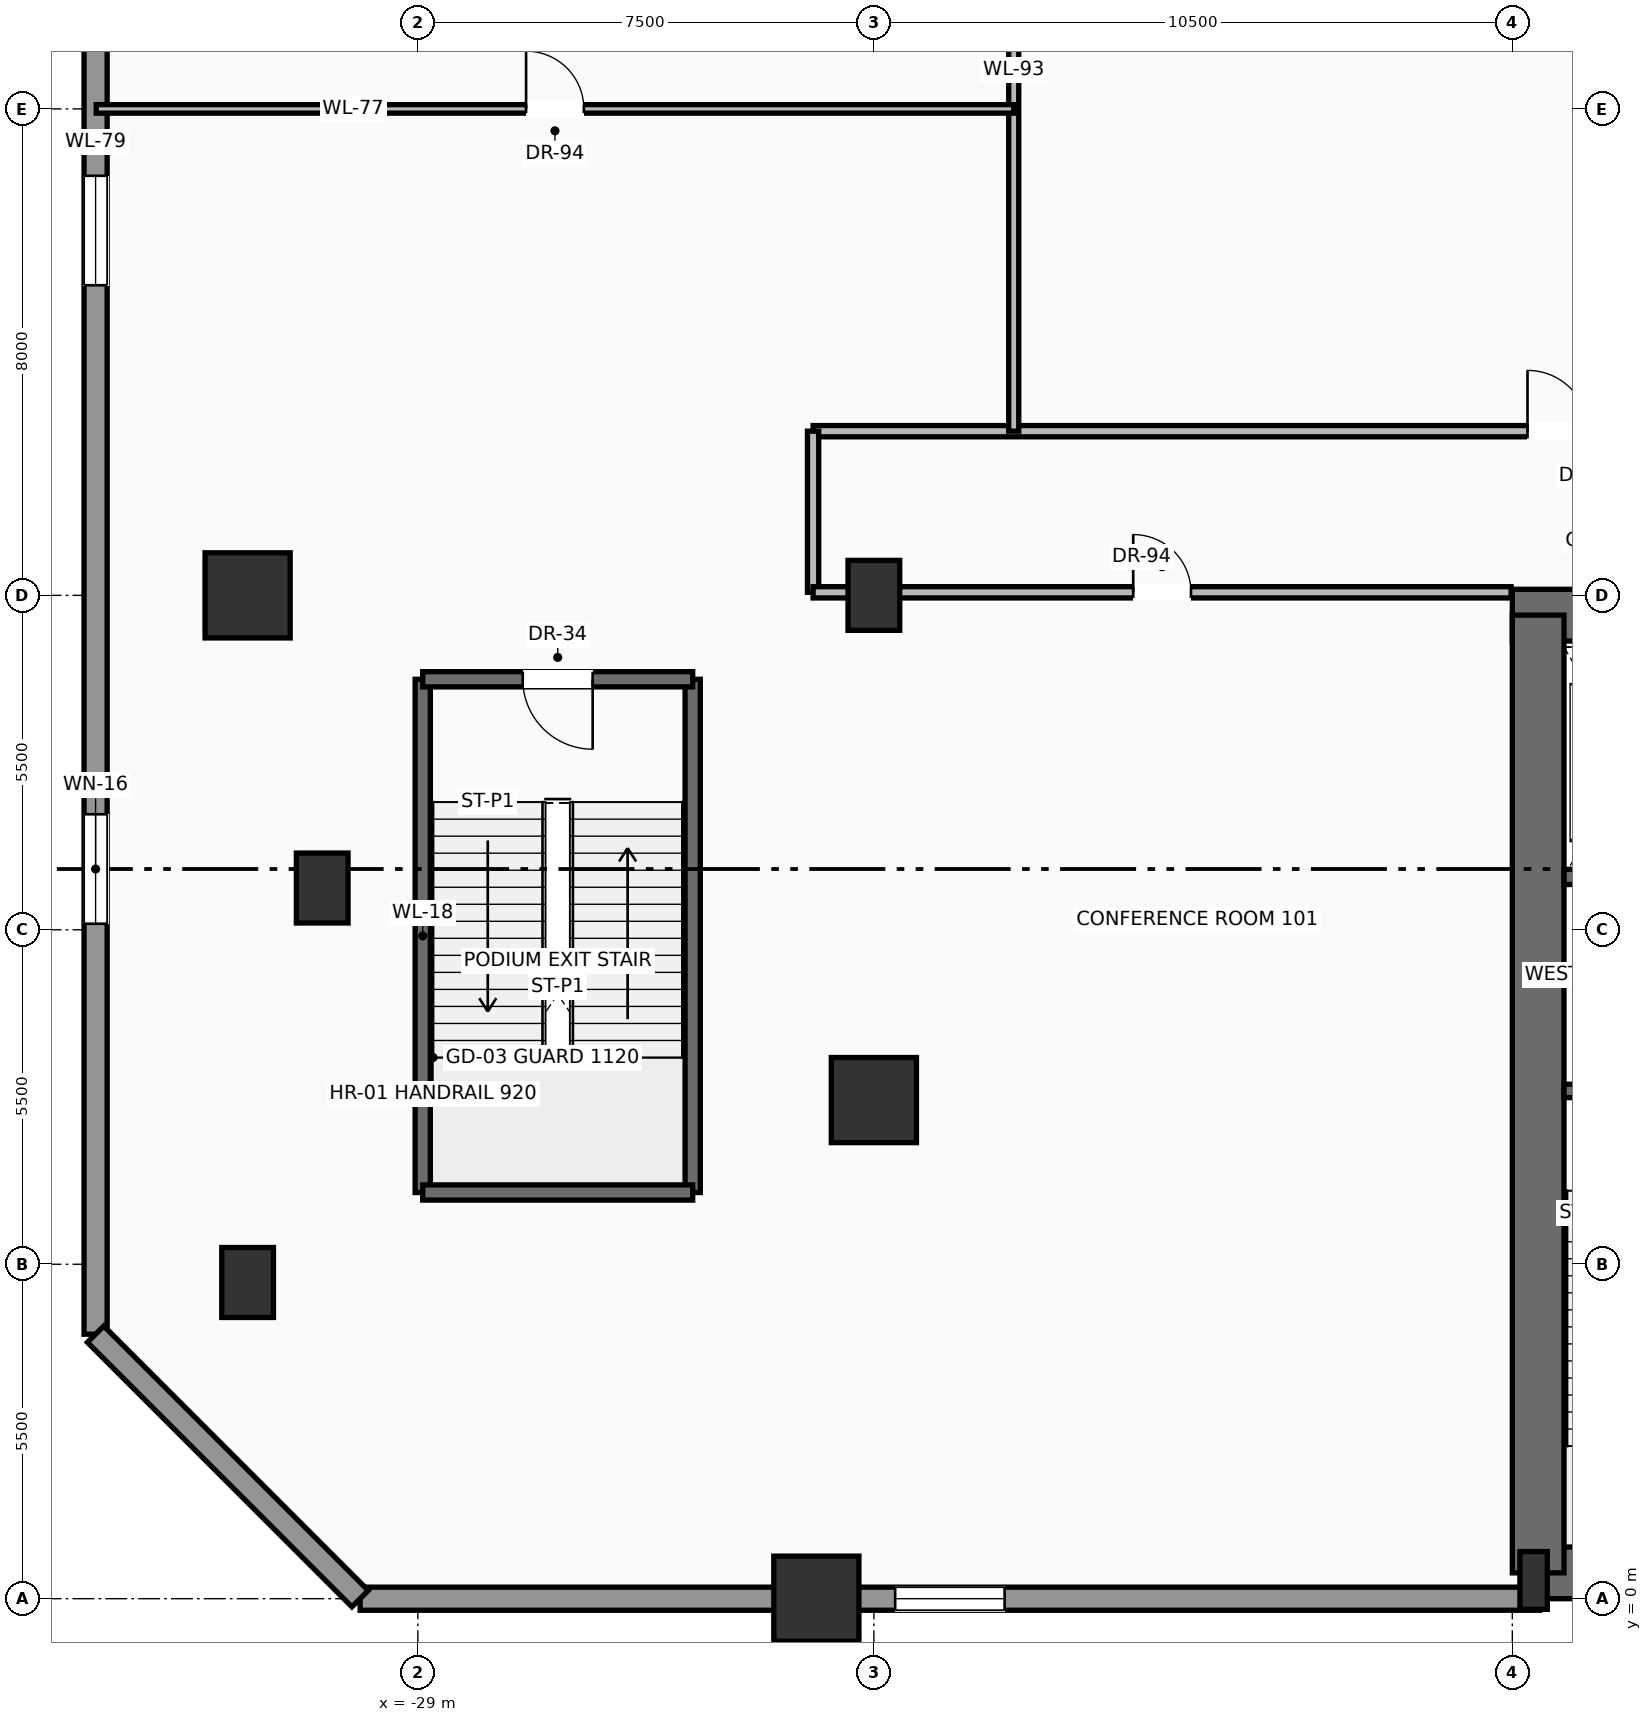
"""IFC4 building model, lengths in metres.
Left out: names, types, materials, properties, quantities, classifications, styles, units other than length and angle.
Written with IfcOpenShell. Run it as: python <this file> out.ifc"""

import sys

from ifc_helpers import new_model, si_unit, direction, frame, frame_2d, origin, origin_2d, place, context, subcontext, project, spatial, rectangle, hollow_rectangle, extrude, source, transform, mapped, element, fill, save


model = new_model("IFC4")
c1 = context("Model", 3, precision=1e-05, world=origin(), true_north=direction((0.0, 1.0)))
c2 = subcontext(c1, "Body", "Model", "MODEL_VIEW")
j1 = project(units=[si_unit("LENGTHUNIT", "METRE"), si_unit("PLANEANGLEUNIT", "RADIAN")], contexts=[c1])
p1 = place(None, origin())
s1 = spatial("IfcSite", under=j1, at=p1, CompositionType="ELEMENT")
p2 = place(p1, origin())
s2 = spatial("IfcBuilding", under=s1, at=p2, CompositionType="ELEMENT")
p3 = place(p2, frame((0.0, 0.0, 5.5)))
s3 = spatial("IfcBuildingStorey", under=s2, at=p3, CompositionType="ELEMENT", Elevation=5.5)
p4 = place(p3, frame((-10.65, 0.425, 0.0), z_axis=(0.0, 0.0, 1.0), x_axis=(1.0, 0.0, 0.0)))
e1 = element("IfcWall", 1, at=p4, inside=s3, PredefinedType="SHEAR", context=c2, shape_type="SweptSolid", body=[
    extrude(rectangle(XDim=21.3, YDim=0.85, at=frame_2d((10.65, 0.0))), origin(), (0.0, 0.0, 1.0), 5.17),
])
p5 = place(p3, frame((-11.0, 16.175, 0.0), z_axis=(0.0, 0.0, 1.0), x_axis=(1.0, 0.0, 0.0)))
e2 = element("IfcWall", 2, at=p5, inside=s3, PredefinedType="SHEAR", context=c2, shape_type="SweptSolid", body=[
    extrude(rectangle(XDim=22.0, YDim=0.85, at=frame_2d((11.0, 0.0))), origin(), (0.0, 0.0, 1.0), 5.17),
])
p6 = place(p5, frame((3.57, 0.0, 0.0)))
e3 = element("IfcOpeningElement", 3, at=p6, cuts=e2, PredefinedType="OPENING", context=c2, shape_type="SweptSolid", body=[
    extrude(rectangle(XDim=1.3, YDim=2.3, at=frame_2d((0.65, 1.15))), frame((0.0, 0.435, 0.0), z_axis=(0.0, -1.0, 0.0), x_axis=(1.0, 0.0, 0.0)), (0.0, 0.0, 1.0), 0.87),
])
p7 = place(p5, frame((10.0, 0.0, 0.0)))
e4 = element("IfcOpeningElement", 4, at=p7, cuts=e2, PredefinedType="OPENING", context=c2, shape_type="SweptSolid", body=[
    extrude(rectangle(XDim=2.0, YDim=2.4, at=frame_2d((1.0, 1.2))), frame((0.0, 0.435, 0.0), z_axis=(0.0, -1.0, 0.0), x_axis=(1.0, 0.0, 0.0)), (0.0, 0.0, 1.0), 0.87),
])
p8 = place(p3, frame((-10.575, 0.425, 0.0), z_axis=(0.0, 0.0, 1.0), x_axis=(0.0, 1.0, 0.0)))
e5 = element("IfcWall", 5, at=p8, inside=s3, PredefinedType="SHEAR", context=c2, shape_type="SweptSolid", body=[
    extrude(rectangle(XDim=15.75, YDim=0.85, at=frame_2d((7.875, 0.0))), origin(), (0.0, 0.0, 1.0), 5.17),
])
m1 = source(origin(), c2, "Body", "SweptSolid", [
    extrude(rectangle(XDim=0.45, YDim=0.95, at=origin_2d()), origin(), (0.0, 0.0, 1.0), 5.5),
])
p9 = place(p3, frame((-10.65, 0.3, 0.0), z_axis=(0.0, 0.0, 1.0), x_axis=(1.0, 0.0, 0.0)))
e6 = element("IfcColumn", 6, at=p9, inside=s3, PredefinedType="PILASTER", context=c2, shape_type="MappedRepresentation", body=[
    mapped(m1, transform((0.0, 0.0, 0.0), scale=1.0)),
])
m2 = source(origin(), c2, "Body", "SweptSolid", [
    extrude(hollow_rectangle(XDim=1.4, YDim=1.4, WallThickness=0.07, at=origin_2d()), origin(), (0.0, 0.0, 1.0), 5.5),
])
for number, where, z_axis, x_axis in (
    (7, (-22.446, 0.0, 0.0), (0.0, 0.0, 1.0), (1.0, 0.0, 0.0)),
    (8, (-21.5, 8.2, 0.0), (0.0, 0.0, 1.0), (1.0, 0.0, 0.0)),
    (9, (-31.8, 16.5, 0.0), (0.0, 0.0, 1.0), (1.0, 0.0, 0.0)),
):
    element("IfcColumn", number, at=place(p3, frame(where, z_axis=z_axis, x_axis=x_axis)), inside=s3, PredefinedType="COLUMN", context=c2, shape_type="MappedRepresentation", body=[
        mapped(m2, transform((0.0, 0.0, 0.0), scale=1.0)),
    ])
m3 = source(origin(), c2, "Body", "SweptSolid", [
    extrude(rectangle(XDim=0.85, YDim=1.15, at=origin_2d()), origin(), (0.0, 0.0, 1.0), 5.5),
])
for number, where, z_axis, x_axis in (
    (10, (-21.5, 16.5, 0.0), (0.0, 0.0, 1.0), (1.0, 0.0, 0.0)),
    (11, (-31.8, 5.2, 0.0), (0.0, 0.0, 1.0), (1.0, 0.0, 0.0)),
    (12, (-30.573, 11.687, 0.0), (0.0, 0.0, 1.0), (1.0, 0.0, 0.0)),
):
    element("IfcColumn", number, at=place(p3, frame(where, z_axis=z_axis, x_axis=x_axis)), inside=s3, PredefinedType="COLUMN", context=c2, shape_type="MappedRepresentation", body=[
        mapped(m3, transform((0.0, 0.0, 0.0), scale=1.0)),
    ])
p10 = place(p3, frame((-34.3, 4.35, 0.0), z_axis=(0.0, 0.0, 1.0), x_axis=(0.0, 1.0, 0.0)))
e13 = element("IfcWall", 13, at=p10, inside=s3, PredefinedType="SOLIDWALL", context=c2, shape_type="SweptSolid", body=[
    extrude(rectangle(XDim=39.2, YDim=0.38, at=frame_2d((19.6, 0.0))), origin(), (0.0, 0.0, 1.0), 4.11),
])
p11 = place(p10, frame((6.75, 0.0, 0.95)))
e14 = element("IfcOpeningElement", 14, at=p11, cuts=e13, PredefinedType="OPENING", context=c2, shape_type="SweptSolid", body=[
    extrude(rectangle(XDim=1.8, YDim=2.4, at=frame_2d((0.9, 1.2))), frame((0.0, 0.2, 0.0), z_axis=(0.0, -1.0, 0.0), x_axis=(1.0, 0.0, 0.0)), (0.0, 0.0, 1.0), 0.4),
])
p12 = place(p10, frame((17.25, 0.0, 0.95)))
e15 = element("IfcOpeningElement", 15, at=p12, cuts=e13, PredefinedType="OPENING", context=c2, shape_type="SweptSolid", body=[
    extrude(rectangle(XDim=1.8, YDim=2.4, at=frame_2d((0.9, 1.2))), frame((0.0, 0.2, 0.0), z_axis=(0.0, -1.0, 0.0), x_axis=(1.0, 0.0, 0.0)), (0.0, 0.0, 1.0), 0.4),
])
p13 = place(p10, frame((27.75, 0.0, 0.95)))
e16 = element("IfcOpeningElement", 16, at=p13, cuts=e13, PredefinedType="OPENING", context=c2, shape_type="SweptSolid", body=[
    extrude(rectangle(XDim=1.8, YDim=2.4, at=frame_2d((0.9, 1.2))), frame((0.0, 0.2, 0.0), z_axis=(0.0, -1.0, 0.0), x_axis=(1.0, 0.0, 0.0)), (0.0, 0.0, 1.0), 0.4),
])
p14 = place(p3, frame((-10.55, 0.0, 0.0), z_axis=(0.0, 0.0, 1.0), x_axis=(-1.0, 0.0, 0.0)))
e17 = element("IfcWall", 17, at=p14, inside=s3, PredefinedType="SOLIDWALL", context=c2, shape_type="SweptSolid", body=[
    extrude(rectangle(XDim=19.4, YDim=0.38, at=frame_2d((9.7, 0.0))), origin(), (0.0, 0.0, 1.0), 4.11),
])
p15 = place(p14, frame((8.8, 0.0, 0.95)))
e18 = element("IfcOpeningElement", 18, at=p15, cuts=e17, PredefinedType="OPENING", context=c2, shape_type="SweptSolid", body=[
    extrude(rectangle(XDim=1.8, YDim=2.4, at=frame_2d((0.9, 1.2))), frame((0.0, 0.2, 0.0), z_axis=(0.0, -1.0, 0.0), x_axis=(1.0, 0.0, 0.0)), (0.0, 0.0, 1.0), 0.4),
])
p16 = place(p3, frame((-29.95, 0.0, 0.0), z_axis=(0.0, 0.0, 1.0), x_axis=(-0.707106781187, 0.707106781187, 0.0)))
e19 = element("IfcWall", 19, at=p16, inside=s3, PredefinedType="SOLIDWALL", context=c2, shape_type="SweptSolid", body=[
    extrude(rectangle(XDim=6.152, YDim=0.38, at=frame_2d((3.076, 0.0))), origin(), (0.0, 0.0, 1.0), 4.11),
])
p17 = place(p3, frame((-5.5, 8.35, 0.0), z_axis=(0.0, 0.0, 1.0), x_axis=(-1.0, 0.0, 0.0)))
e20 = element("IfcWall", 20, at=p17, inside=s3, PredefinedType="SOLIDWALL", context=c2, shape_type="SweptSolid", body=[
    extrude(rectangle(XDim=4.65, YDim=0.22, at=frame_2d((2.325, 0.0))), origin(), (0.0, 0.0, 1.0), 5.17),
])
p18 = place(p17, frame((2.5, 0.0, 0.0)))
e21 = element("IfcOpeningElement", 21, at=p18, cuts=e20, PredefinedType="OPENING", context=c2, shape_type="SweptSolid", body=[
    extrude(rectangle(XDim=1.15, YDim=2.2, at=frame_2d((0.575, 1.1))), frame((0.0, 0.12, 0.0), z_axis=(0.0, -1.0, 0.0), x_axis=(1.0, 0.0, 0.0)), (0.0, 0.0, 1.0), 0.24),
])
p19 = place(p3, frame((-5.5, 11.87, 0.0), z_axis=(0.0, 0.0, 1.0), x_axis=(-1.0, 0.0, 0.0)))
e22 = element("IfcWall", 22, at=p19, inside=s3, PredefinedType="SOLIDWALL", context=c2, shape_type="SweptSolid", body=[
    extrude(rectangle(XDim=4.65, YDim=0.25, at=frame_2d((2.325, 0.0))), origin(), (0.0, 0.0, 1.0), 5.17),
])
p20 = place(p19, frame((2.95, 0.0, 0.0)))
e23 = element("IfcOpeningElement", 23, at=p20, cuts=e22, PredefinedType="OPENING", context=c2, shape_type="SweptSolid", body=[
    extrude(rectangle(XDim=1.2, YDim=2.25, at=frame_2d((0.6, 1.125))), frame((0.0, 0.135, 0.0), z_axis=(0.0, -1.0, 0.0), x_axis=(1.0, 0.0, 0.0)), (0.0, 0.0, 1.0), 0.27),
])
for number, where, z_axis, x_axis in (
    (24, (-28.92, 6.68, 0.0), (0.0, 0.0, 1.0), (0.0, 1.0, 0.0)),
    (25, (-24.48, 6.68, 0.0), (0.0, 0.0, 1.0), (0.0, 1.0, 0.0)),
):
    element("IfcWall", number, at=place(p3, frame(where, z_axis=z_axis, x_axis=x_axis)), inside=s3, PredefinedType="SOLIDWALL", context=c2, shape_type="SweptSolid", body=[
        extrude(rectangle(XDim=8.44, YDim=0.25, at=frame_2d((4.22, 0.0))), origin(), (0.0, 0.0, 1.0), 5.17),
    ])
p21 = place(p3, frame((-28.92, 6.68, 0.0), z_axis=(0.0, 0.0, 1.0), x_axis=(1.0, 0.0, 0.0)))
e26 = element("IfcWall", 26, at=p21, inside=s3, PredefinedType="SOLIDWALL", context=c2, shape_type="SweptSolid", body=[
    extrude(rectangle(XDim=4.44, YDim=0.25, at=frame_2d((2.22, 0.0))), origin(), (0.0, 0.0, 1.0), 5.17),
])
p22 = place(p3, frame((-24.48, 15.12, 0.0), z_axis=(0.0, 0.0, 1.0), x_axis=(-1.0, 0.0, 0.0)))
e27 = element("IfcWall", 27, at=p22, inside=s3, PredefinedType="SOLIDWALL", context=c2, shape_type="SweptSolid", body=[
    extrude(rectangle(XDim=4.44, YDim=0.25, at=frame_2d((2.22, 0.0))), origin(), (0.0, 0.0, 1.0), 5.17),
])
p23 = place(p22, frame((1.645, 0.0, 0.0)))
e28 = element("IfcOpeningElement", 28, at=p23, cuts=e27, PredefinedType="OPENING", context=c2, shape_type="SweptSolid", body=[
    extrude(rectangle(XDim=1.15, YDim=2.2, at=frame_2d((0.575, 1.1))), frame((0.0, 0.135, 0.0), z_axis=(0.0, -1.0, 0.0), x_axis=(1.0, 0.0, 0.0)), (0.0, 0.0, 1.0), 0.27),
])
p24 = place(p3, frame((-22.5, 19.2, 0.0), z_axis=(0.0, 0.0, 1.0), x_axis=(1.0, 0.0, 0.0)))
e29 = element("IfcWall", 29, at=p24, inside=s3, PredefinedType="PARTITIONING", context=c2, shape_type="SweptSolid", body=[
    extrude(rectangle(XDim=45.0, YDim=0.185, at=frame_2d((22.5, 0.0))), origin(), (0.0, 0.0, 1.0), 4.122),
])
p25 = place(p24, frame((11.75, 0.0, 0.0)))
e30 = element("IfcOpeningElement", 30, at=p25, cuts=e29, PredefinedType="OPENING", context=c2, shape_type="SweptSolid", body=[
    extrude(rectangle(XDim=2.0, YDim=2.4, at=frame_2d((1.0, 1.2))), frame((0.0, 0.103, 0.0), z_axis=(0.0, -1.0, 0.0), x_axis=(1.0, 0.0, 0.0)), (0.0, 0.0, 1.0), 0.205),
])
p26 = place(p24, frame((31.25, 0.0, 0.0)))
e31 = element("IfcOpeningElement", 31, at=p26, cuts=e29, PredefinedType="OPENING", context=c2, shape_type="SweptSolid", body=[
    extrude(rectangle(XDim=2.0, YDim=2.4, at=frame_2d((1.0, 1.2))), frame((0.0, 0.103, 0.0), z_axis=(0.0, -1.0, 0.0), x_axis=(1.0, 0.0, 0.0)), (0.0, 0.0, 1.0), 0.205),
])
p27 = place(p3, frame((-22.5, 16.55, 0.0), z_axis=(0.0, 0.0, 1.0), x_axis=(0.0, 1.0, 0.0)))
e32 = element("IfcWall", 32, at=p27, inside=s3, PredefinedType="PARTITIONING", context=c2, shape_type="SweptSolid", body=[
    extrude(rectangle(XDim=2.65, YDim=0.185, at=frame_2d((1.325, 0.0))), origin(), (0.0, 0.0, 1.0), 5.162),
])
p28 = place(p3, frame((-22.5, 16.55, 0.0), z_axis=(0.0, 0.0, 1.0), x_axis=(1.0, 0.0, 0.0)))
e33 = element("IfcWall", 33, at=p28, inside=s3, PredefinedType="PARTITIONING", context=c2, shape_type="SweptSolid", body=[
    extrude(rectangle(XDim=11.48, YDim=0.185, at=frame_2d((5.74, 0.0))), origin(), (0.0, 0.0, 1.0), 4.122),
])
p29 = place(p28, frame((5.265, 0.0, 0.0)))
e34 = element("IfcOpeningElement", 34, at=p29, cuts=e33, PredefinedType="OPENING", context=c2, shape_type="SweptSolid", body=[
    extrude(rectangle(XDim=0.95, YDim=2.2, at=frame_2d((0.475, 1.1))), frame((0.0, 0.103, 0.0), z_axis=(0.0, -1.0, 0.0), x_axis=(1.0, 0.0, 0.0)), (0.0, 0.0, 1.0), 0.205),
])
p30 = place(p3, frame((-19.2, 19.2, 0.0), z_axis=(0.0, 0.0, 1.0), x_axis=(0.0, 1.0, 0.0)))
e35 = element("IfcWall", 35, at=p30, inside=s3, PredefinedType="PARTITIONING", context=c2, shape_type="SweptSolid", body=[
    extrude(rectangle(XDim=21.2, YDim=0.165, at=frame_2d((10.6, 0.0))), origin(), (0.0, 0.0, 1.0), 4.122),
])
p31 = place(p30, frame((8.824, 0.0, 0.0)))
e36 = element("IfcOpeningElement", 36, at=p31, cuts=e35, PredefinedType="OPENING", context=c2, shape_type="SweptSolid", body=[
    extrude(rectangle(XDim=1.5, YDim=2.25, at=frame_2d((0.75, 1.125))), frame((0.0, 0.093, 0.0), z_axis=(0.0, -1.0, 0.0), x_axis=(1.0, 0.0, 0.0)), (0.0, 0.0, 1.0), 0.185),
])
p32 = place(p3, frame((-34.29, 24.5, 0.0), z_axis=(0.0, 0.0, 1.0), x_axis=(1.0, 0.0, 0.0)))
e37 = element("IfcWall", 37, at=p32, inside=s3, PredefinedType="PARTITIONING", context=c2, shape_type="SweptSolid", body=[
    extrude(rectangle(XDim=15.09, YDim=0.14, at=frame_2d((7.545, 0.0))), origin(), (0.0, 0.0, 1.0), 4.235),
])
p33 = place(p32, frame((7.07, 0.0, 0.0)))
e38 = element("IfcOpeningElement", 38, at=p33, cuts=e37, PredefinedType="OPENING", context=c2, shape_type="SweptSolid", body=[
    extrude(rectangle(XDim=0.95, YDim=2.2, at=frame_2d((0.475, 1.1))), frame((0.0, 0.08, 0.0), z_axis=(0.0, -1.0, 0.0), x_axis=(1.0, 0.0, 0.0)), (0.0, 0.0, 1.0), 0.16),
])
m4 = source(origin(), c2, "Body", "SweptSolid", [
    extrude(rectangle(XDim=1.8, YDim=2.4, at=frame_2d((0.9, 1.2))), frame((0.0, 0.03, 0.0), z_axis=(0.0, -1.0, 0.0), x_axis=(1.0, 0.0, 0.0)), (0.0, 0.0, 1.0), 0.06),
])
p34 = place(p11, origin())
e39 = element("IfcWindow", 39, at=p34, inside=s3, PartitioningType="SINGLE_PANEL", PredefinedType="WINDOW", context=c2, shape_type="MappedRepresentation", body=[
    mapped(m4, transform((0.0, 0.0, 0.0), scale=1.0)),
])
fill(e14, e39)
p35 = place(p12, origin())
e40 = element("IfcWindow", 40, at=p35, inside=s3, PartitioningType="SINGLE_PANEL", PredefinedType="WINDOW", context=c2, shape_type="MappedRepresentation", body=[
    mapped(m4, transform((0.0, 0.0, 0.0), scale=1.0)),
])
fill(e15, e40)
p36 = place(p15, origin())
e41 = element("IfcWindow", 41, at=p36, inside=s3, PartitioningType="SINGLE_PANEL", PredefinedType="WINDOW", context=c2, shape_type="MappedRepresentation", body=[
    mapped(m4, transform((0.0, 0.0, 0.0), scale=1.0)),
])
fill(e18, e41)
m5 = source(origin(), c2, "Body", "SweptSolid", [
    extrude(rectangle(XDim=1.15, YDim=2.2, at=frame_2d((0.575, 1.1))), frame((0.0, 0.025, 0.0), z_axis=(0.0, -1.0, 0.0), x_axis=(1.0, 0.0, 0.0)), (0.0, 0.0, 1.0), 0.05),
])
p37 = place(p23, origin())
e42 = element("IfcDoor", 42, at=p37, inside=s3, OperationType="SINGLE_SWING_LEFT", PredefinedType="DOOR", context=c2, shape_type="MappedRepresentation", body=[
    mapped(m5, transform((0.0, 0.0, 0.0), scale=1.0)),
])
fill(e28, e42)
m6 = source(origin(), c2, "Body", "SweptSolid", [
    extrude(rectangle(XDim=2.0, YDim=2.4, at=frame_2d((1.0, 1.2))), frame((0.0, 0.025, 0.0), z_axis=(0.0, -1.0, 0.0), x_axis=(1.0, 0.0, 0.0)), (0.0, 0.0, 1.0), 0.05),
])
p38 = place(p25, origin())
e43 = element("IfcDoor", 43, at=p38, inside=s3, OperationType="DOUBLE_DOOR_SINGLE_SWING", PredefinedType="DOOR", context=c2, shape_type="MappedRepresentation", body=[
    mapped(m6, transform((0.0, 0.0, 0.0), scale=1.0)),
])
fill(e30, e43)
m7 = source(origin(), c2, "Body", "SweptSolid", [
    extrude(rectangle(XDim=0.95, YDim=2.2, at=frame_2d((0.475, 1.1))), frame((0.0, 0.025, 0.0), z_axis=(0.0, -1.0, 0.0), x_axis=(1.0, 0.0, 0.0)), (0.0, 0.0, 1.0), 0.05),
])
p39 = place(p29, origin())
e44 = element("IfcDoor", 44, at=p39, inside=s3, OperationType="SINGLE_SWING_LEFT", PredefinedType="DOOR", context=c2, shape_type="MappedRepresentation", body=[
    mapped(m7, transform((0.0, 0.0, 0.0), scale=1.0)),
])
fill(e34, e44)
p40 = place(p33, origin())
e45 = element("IfcDoor", 45, at=p40, inside=s3, OperationType="SINGLE_SWING_LEFT", PredefinedType="DOOR", context=c2, shape_type="MappedRepresentation", body=[
    mapped(m7, transform((0.0, 0.0, 0.0), scale=1.0)),
])
fill(e38, e45)
save(model, sys.argv[1])
